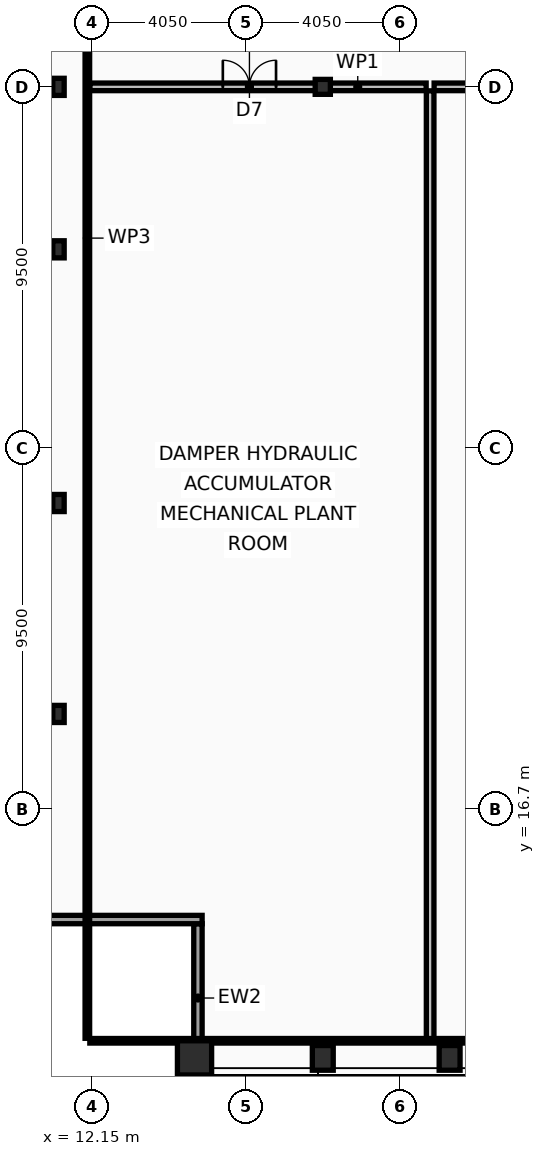
"""IFC4 building model, lengths in metres.
Left out: names, types, materials, properties, quantities, classifications, styles, units other than length and angle.
Written with IfcOpenShell. Run it as: python <this file> out.ifc"""

import sys

from ifc_helpers import new_model, si_unit, direction, frame, frame_2d, origin, origin_2d, place, context, subcontext, project, spatial, rectangle, hollow_rectangle, i_section, extrude, element, fill, save


model = new_model("IFC4")
c1 = context("Model", 3, precision=1e-05, world=origin(), true_north=direction((0.0, 1.0)))
c2 = subcontext(c1, "Body", "Model", "MODEL_VIEW")
j1 = project(units=[si_unit("LENGTHUNIT", "METRE"), si_unit("PLANEANGLEUNIT", "RADIAN")], contexts=[c1])
p1 = place(None, origin())
s1 = spatial("IfcSite", under=j1, at=p1, CompositionType="ELEMENT")
p2 = place(p1, origin())
s2 = spatial("IfcBuilding", under=s1, at=p2, CompositionType="ELEMENT")
p3 = place(p2, frame((0.0, 0.0, 350.6)))
s3 = spatial("IfcBuildingStorey", under=s2, at=p3, CompositionType="ELEMENT", Elevation=350.6)
p4 = place(p3, frame((14.85, 10.15, 0.0), z_axis=(0.0, 0.0, 1.0), x_axis=(1.0, 0.0, 0.0)))
e1 = element("IfcColumn", 1, at=p4, inside=s3, PredefinedType="COLUMN", context=c2, shape_type="SweptSolid", body=[
    extrude(hollow_rectangle(XDim=0.9, YDim=0.9, WallThickness=0.05, at=origin_2d()), origin(), (0.0, 0.0, 1.0), 5.6),
])
for number, where, z_axis, x_axis in (
    (2, (18.225, 10.15, 0.0), (0.0, 0.0, 1.0), (1.0, 0.0, 0.0)),
    (3, (21.562, 10.15, 0.0), (0.0, 0.0, 1.0), (1.0, 0.0, 0.0)),
):
    element("IfcColumn", number, at=place(p3, frame(where, z_axis=z_axis, x_axis=x_axis)), inside=s3, PredefinedType="COLUMN", context=c2, shape_type="SweptSolid", body=[
        extrude(hollow_rectangle(XDim=0.55, YDim=0.65, WallThickness=0.04, at=origin_2d()), origin(), (0.0, 0.0, 1.0), 5.6),
    ])
for number, where, z_axis, x_axis in (
    (4, (11.27, 19.2, 0.0), (0.0, 0.0, 1.0), (1.0, 0.0, 0.0)),
    (5, (11.27, 24.75, 0.0), (0.0, 0.0, 1.0), (1.0, 0.0, 0.0)),
    (6, (11.27, 31.425, 0.0), (0.0, 0.0, 1.0), (1.0, 0.0, 0.0)),
    (7, (11.27, 35.7, 0.0), (0.0, 0.0, 1.0), (1.0, 0.0, 0.0)),
):
    element("IfcColumn", number, at=place(p3, frame(where, z_axis=z_axis, x_axis=x_axis)), inside=s3, PredefinedType="COLUMN", context=c2, shape_type="SweptSolid", body=[
        extrude(i_section(OverallWidth=0.3, OverallDepth=0.45, WebThickness=0.014, FlangeThickness=0.026, at=origin_2d()), origin(), (0.0, 0.0, 1.0), 5.6),
    ])
p5 = place(p3, frame((18.225, 35.7, 0.0), z_axis=(0.0, 0.0, 1.0), x_axis=(1.0, 0.0, 0.0)))
e8 = element("IfcColumn", 8, at=p5, inside=s3, PredefinedType="COLUMN", context=c2, shape_type="SweptSolid", body=[
    extrude(i_section(OverallWidth=0.399, OverallDepth=0.393, WebThickness=0.023, FlangeThickness=0.037, at=origin_2d()), origin(), (0.0, 0.0, 1.0), 5.6),
])
p6 = place(p3, frame((14.94, 9.77, 0.0), z_axis=(0.0, 0.0, 1.0), x_axis=(0.0, 1.0, 0.0)))
e9 = element("IfcWall", 9, at=p6, inside=s3, PredefinedType="SOLIDWALL", context=c2, shape_type="SweptSolid", body=[
    extrude(rectangle(XDim=3.91, YDim=0.22, at=frame_2d((1.955, 0.0))), origin(), (0.0, 0.0, 1.0), 4.84),
])
p7 = place(p3, frame((15.05, 13.79, 0.0), z_axis=(0.0, 0.0, 1.0), x_axis=(-1.0, 0.0, 0.0)))
e10 = element("IfcWall", 10, at=p7, inside=s3, PredefinedType="SOLIDWALL", context=c2, shape_type="SweptSolid", body=[
    extrude(rectangle(XDim=4.13, YDim=0.22, at=frame_2d((2.065, 0.0))), origin(), (0.0, 0.0, 1.0), 4.84),
])
p8 = place(p3, frame((12.095, 35.7, 0.0), z_axis=(0.0, 0.0, 1.0), x_axis=(1.0, 0.0, 0.0)))
e11 = element("IfcWall", 11, at=p8, inside=s3, PredefinedType="PARTITIONING", context=c2, shape_type="SweptSolid", body=[
    extrude(rectangle(XDim=8.85, YDim=0.2, at=frame_2d((4.425, 0.0))), origin(), (0.0, 0.0, 1.0), 4.79),
])
p9 = place(p8, frame((3.5, 0.0, 0.0)))
e12 = element("IfcOpeningElement", 12, at=p9, cuts=e11, PredefinedType="OPENING", context=c2, shape_type="SweptSolid", body=[
    extrude(rectangle(XDim=1.4, YDim=2.15, at=frame_2d((0.7, 1.075))), frame((0.0, 0.11, 0.0), z_axis=(0.0, -1.0, 0.0), x_axis=(1.0, 0.0, 0.0)), (0.0, 0.0, 1.0), 0.22),
])
p10 = place(p3, frame((21.155, 35.7, 0.0), z_axis=(0.0, 0.0, 1.0), x_axis=(1.0, 0.0, 0.0)))
e13 = element("IfcWall", 13, at=p10, inside=s3, PredefinedType="PARTITIONING", context=c2, shape_type="SweptSolid", body=[
    extrude(rectangle(XDim=4.19, YDim=0.2, at=frame_2d((2.095, 0.0))), origin(), (0.0, 0.0, 1.0), 4.79),
])
p11 = place(p3, frame((21.05, 10.565, 0.0), z_axis=(0.0, 0.0, 1.0), x_axis=(0.0, 1.0, 0.0)))
e14 = element("IfcWall", 14, at=p11, inside=s3, PredefinedType="PARTITIONING", context=c2, shape_type="SweptSolid", body=[
    extrude(rectangle(XDim=25.03, YDim=0.2, at=frame_2d((12.515, 0.0))), origin(), (0.0, 0.0, 1.0), 4.59),
])
p12 = place(p3, frame((12.03, 10.665, 0.0), z_axis=(0.0, 0.0, 1.0), x_axis=(0.0, 1.0, 0.0)))
e15 = element("IfcWall", 15, at=p12, inside=s3, PredefinedType="PARTITIONING", context=c2, shape_type="SweptSolid", body=[
    extrude(rectangle(XDim=42.11, YDim=0.12, at=frame_2d((21.055, 0.0))), origin(), (0.0, 0.0, 1.0), 4.79),
])
p13 = place(p3, frame((12.095, 10.6, 0.0), z_axis=(0.0, 0.0, 1.0), x_axis=(1.0, 0.0, 0.0)))
e16 = element("IfcWall", 16, at=p13, inside=s3, PredefinedType="PARTITIONING", context=c2, shape_type="SweptSolid", body=[
    extrude(rectangle(XDim=48.71, YDim=0.12, at=frame_2d((24.355, 0.0))), origin(), (0.0, 0.0, 1.0), 4.79),
])
p14 = place(p9, origin())
e17 = element("IfcDoor", 17, at=p14, inside=s3, OperationType="DOUBLE_DOOR_SINGLE_SWING", PredefinedType="DOOR", context=c2, shape_type="SweptSolid", body=[
    extrude(rectangle(XDim=1.4, YDim=2.15, at=frame_2d((0.7, 1.075))), frame((0.0, 0.025, 0.0), z_axis=(0.0, -1.0, 0.0), x_axis=(1.0, 0.0, 0.0)), (0.0, 0.0, 1.0), 0.05),
])
fill(e12, e17)
save(model, sys.argv[1])
